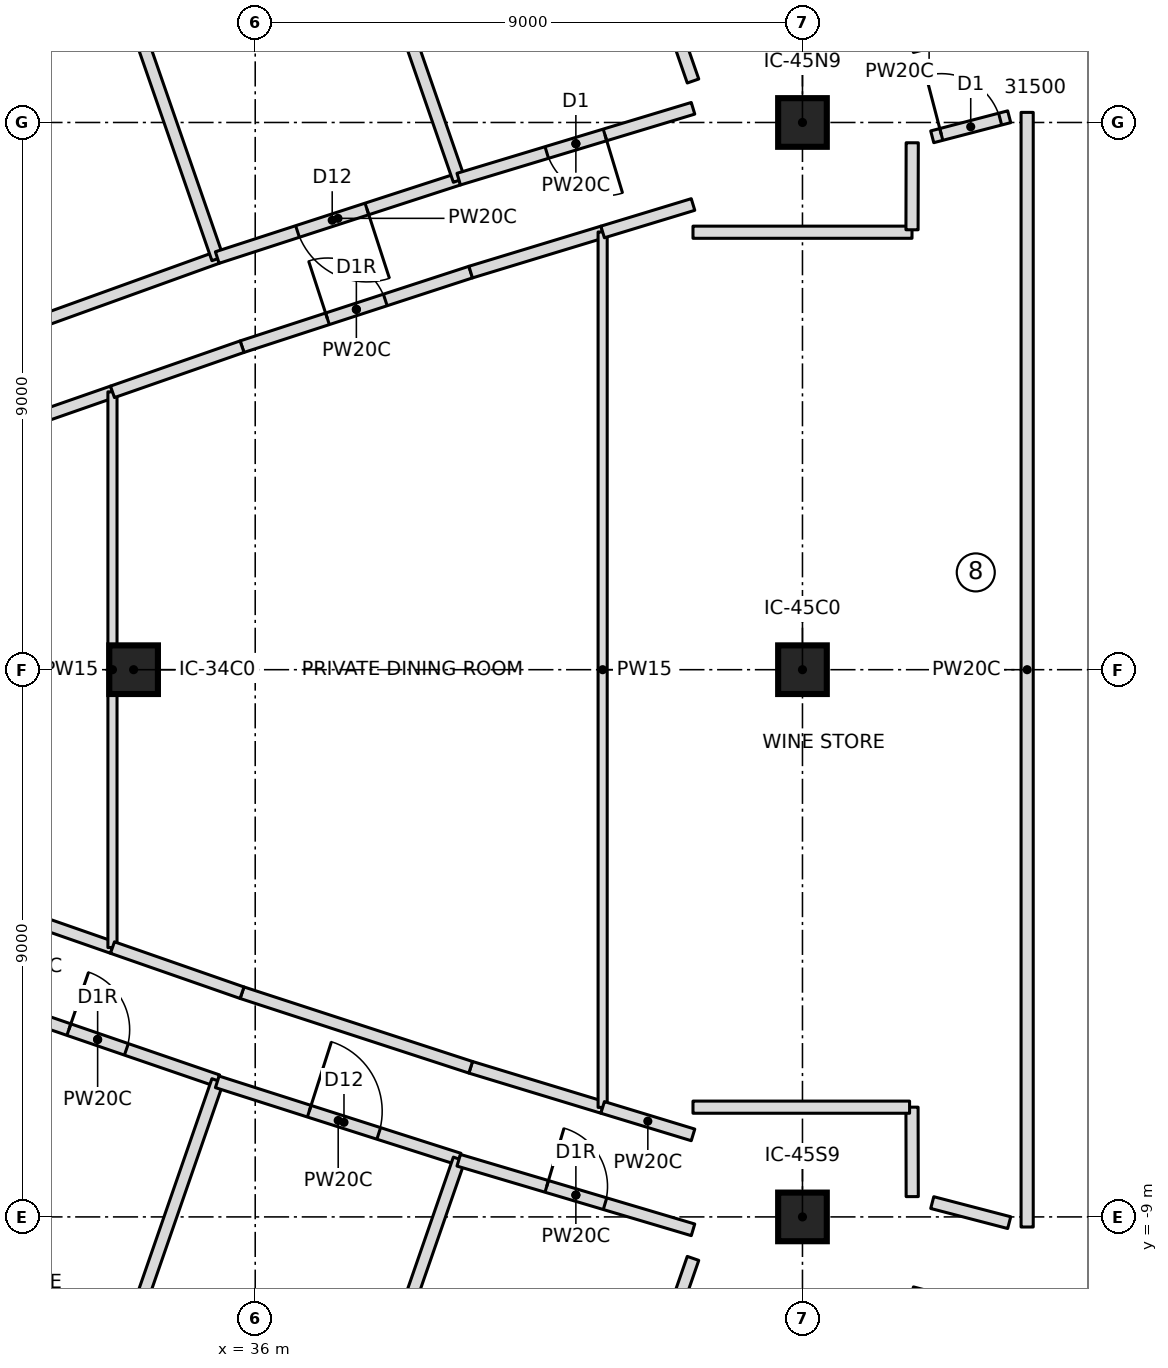
"""IFC4 building model, lengths in metres.
Left out: names, types, materials, properties, quantities, classifications, styles, units other than length and angle.
Written with IfcOpenShell. Run it as: python <this file> out.ifc"""

import sys

from ifc_helpers import new_model, si_unit, direction, frame, frame_2d, origin, origin_2d, place, context, subcontext, project, spatial, rectangle, extrude, element, fill, save


model = new_model("IFC4")
c1 = context("Model", 3, precision=1e-05, world=origin(), true_north=direction((0.0, 1.0)))
c2 = subcontext(c1, "Body", "Model", "MODEL_VIEW")
j1 = project(units=[si_unit("LENGTHUNIT", "METRE"), si_unit("PLANEANGLEUNIT", "RADIAN")], contexts=[c1])
p1 = place(None, origin())
s1 = spatial("IfcSite", under=j1, at=p1, CompositionType="ELEMENT")
p2 = place(p1, origin())
s2 = spatial("IfcBuilding", under=s1, at=p2, CompositionType="ELEMENT")
p3 = place(p2, frame((0.0, 0.0, 313.2)))
s3 = spatial("IfcBuildingStorey", under=s2, at=p3, CompositionType="ELEMENT", Elevation=313.2)
for number, where, z_axis, x_axis in (
    (1, (34.0, 0.0, 0.0), (0.0, 0.0, 1.0), (1.0, 0.0, 0.0)),
    (2, (45.0, -9.0, 0.0), (0.0, 0.0, 1.0), (1.0, 0.0, 0.0)),
    (3, (45.0, 0.0, 0.0), (0.0, 0.0, 1.0), (1.0, 0.0, 0.0)),
    (4, (45.0, 9.0, 0.0), (0.0, 0.0, 1.0), (1.0, 0.0, 0.0)),
):
    element("IfcColumn", number, at=place(p3, frame(where, z_axis=z_axis, x_axis=x_axis)), inside=s3, PredefinedType="COLUMN", context=c2, shape_type="SweptSolid", body=[
        extrude(rectangle(XDim=0.8, YDim=0.8, at=origin_2d()), origin(), (0.0, 0.0, 1.0), 5.4),
    ])
p4 = place(p3, frame((35.376, 6.779, 0.0), z_axis=(0.0, 0.0, 1.0), x_axis=(-0.940653782276, -0.339367738433, 0.0)))
e5 = element("IfcWall", 5, at=p4, inside=s3, PredefinedType="PARTITIONING", context=c2, shape_type="SweptSolid", body=[
    extrude(rectangle(XDim=8.347, YDim=0.2, at=frame_2d((4.174, 0.0))), origin(), (0.0, 0.0, 1.0), 5.1),
])
p5 = place(p4, frame((3.674, 0.0, 0.0)))
e6 = element("IfcOpeningElement", 6, at=p5, cuts=e5, PredefinedType="OPENING", context=c2, shape_type="SweptSolid", body=[
    extrude(rectangle(XDim=2.0, YDim=2.4, at=frame_2d((1.0, 1.2))), frame((0.0, 0.11, 0.0), z_axis=(0.0, -1.0, 0.0), x_axis=(1.0, 0.0, 0.0)), (0.0, 0.0, 1.0), 0.22),
])
p6 = place(p3, frame((35.382, 6.76, 0.0), z_axis=(0.0, 0.0, 1.0), x_axis=(-0.327699570064, 0.944781981083, 0.0)))
e7 = element("IfcWall", 7, at=p6, inside=s3, PredefinedType="PARTITIONING", context=c2, shape_type="SweptSolid", body=[
    extrude(rectangle(XDim=7.601, YDim=0.2, at=frame_2d((3.801, 0.0))), origin(), (0.0, 0.0, 1.0), 5.1),
])
p7 = place(p3, frame((39.347, 8.068, 0.0), z_axis=(0.0, 0.0, 1.0), x_axis=(-0.951104948213, -0.308867896493, 0.0)))
e8 = element("IfcWall", 8, at=p7, inside=s3, PredefinedType="PARTITIONING", context=c2, shape_type="SweptSolid", body=[
    extrude(rectangle(XDim=4.175, YDim=0.2, at=frame_2d((2.087, 0.0))), origin(), (0.0, 0.0, 1.0), 5.1),
])
p8 = place(p7, frame((1.588, 0.0, 0.0)))
e9 = element("IfcOpeningElement", 9, at=p8, cuts=e8, PredefinedType="OPENING", context=c2, shape_type="SweptSolid", body=[
    extrude(rectangle(XDim=1.2, YDim=2.1, at=frame_2d((0.6, 1.05))), frame((0.0, 0.11, 0.0), z_axis=(0.0, -1.0, 0.0), x_axis=(1.0, 0.0, 0.0)), (0.0, 0.0, 1.0), 0.22),
])
p9 = place(p3, frame((39.354, 8.049, 0.0), z_axis=(0.0, 0.0, 1.0), x_axis=(-0.327741126954, 0.944767565967, 0.0)))
e10 = element("IfcWall", 10, at=p9, inside=s3, PredefinedType="PARTITIONING", context=c2, shape_type="SweptSolid", body=[
    extrude(rectangle(XDim=7.606, YDim=0.2, at=frame_2d((3.803, 0.0))), origin(), (0.0, 0.0, 1.0), 5.1),
])
p10 = place(p3, frame((43.2, 9.233, 0.0), z_axis=(0.0, 0.0, 1.0), x_axis=(-0.957187982889, -0.289467036833, 0.0)))
e11 = element("IfcWall", 11, at=p10, inside=s3, PredefinedType="PARTITIONING", context=c2, shape_type="SweptSolid", body=[
    extrude(rectangle(XDim=4.026, YDim=0.2, at=frame_2d((2.013, 0.0))), origin(), (0.0, 0.0, 1.0), 5.1),
])
p11 = place(p10, frame((1.513, 0.0, 0.0)))
e12 = element("IfcOpeningElement", 12, at=p11, cuts=e11, PredefinedType="OPENING", context=c2, shape_type="SweptSolid", body=[
    extrude(rectangle(XDim=1.0, YDim=2.1, at=frame_2d((0.5, 1.05))), frame((0.0, 0.11, 0.0), z_axis=(0.0, -1.0, 0.0), x_axis=(1.0, 0.0, 0.0)), (0.0, 0.0, 1.0), 0.22),
])
p12 = place(p3, frame((43.2, 9.682, 0.0), z_axis=(0.0, 0.0, 1.0), x_axis=(-0.327701896972, 0.944781173987, 0.0)))
e13 = element("IfcWall", 13, at=p12, inside=s3, PredefinedType="PARTITIONING", context=c2, shape_type="SweptSolid", body=[
    extrude(rectangle(XDim=7.16, YDim=0.2, at=frame_2d((3.58, 0.0))), origin(), (0.0, 0.0, 1.0), 5.1),
])
p13 = place(p3, frame((47.365, 10.396, 0.0), z_axis=(0.0, 0.0, 1.0), x_axis=(-0.967635017449, -0.252353864654, 0.0)))
e14 = element("IfcWall", 14, at=p13, inside=s3, PredefinedType="PARTITIONING", context=c2, shape_type="SweptSolid", body=[
    extrude(rectangle(XDim=0.584, YDim=0.2, at=frame_2d((0.292, 0.0))), origin(), (0.0, 0.0, 1.0), 5.1),
])
p14 = place(p3, frame((31.434, -5.404, 0.0), z_axis=(0.0, 0.0, 1.0), x_axis=(0.945814630363, -0.324707075672, 0.0)))
e15 = element("IfcWall", 15, at=p14, inside=s3, PredefinedType="PARTITIONING", context=c2, shape_type="SweptSolid", body=[
    extrude(rectangle(XDim=4.174, YDim=0.2, at=frame_2d((2.087, 0.0))), origin(), (0.0, 0.0, 1.0), 5.1),
])
p15 = place(p14, frame((1.587, 0.0, 0.0)))
e16 = element("IfcOpeningElement", 16, at=p15, cuts=e15, PredefinedType="OPENING", context=c2, shape_type="SweptSolid", body=[
    extrude(rectangle(XDim=1.0, YDim=2.1, at=frame_2d((0.5, 1.05))), frame((0.0, 0.11, 0.0), z_axis=(0.0, -1.0, 0.0), x_axis=(1.0, 0.0, 0.0)), (0.0, 0.0, 1.0), 0.22),
])
p16 = place(p3, frame((32.891, -13.941, 0.0), z_axis=(0.0, 0.0, 1.0), x_axis=(0.327699570064, 0.944781981083, 0.0)))
e17 = element("IfcWall", 17, at=p16, inside=s3, PredefinedType="PARTITIONING", context=c2, shape_type="SweptSolid", body=[
    extrude(rectangle(XDim=7.601, YDim=0.2, at=frame_2d((3.801, 0.0))), origin(), (0.0, 0.0, 1.0), 5.1),
])
p17 = place(p3, frame((35.376, -6.779, 0.0), z_axis=(0.0, 0.0, 1.0), x_axis=(0.952572699992, -0.304311109278, 0.0)))
e18 = element("IfcWall", 18, at=p17, inside=s3, PredefinedType="PARTITIONING", context=c2, shape_type="SweptSolid", body=[
    extrude(rectangle(XDim=4.176, YDim=0.2, at=frame_2d((2.088, 0.0))), origin(), (0.0, 0.0, 1.0), 5.1),
])
p18 = place(p17, frame((1.588, 0.0, 0.0)))
e19 = element("IfcOpeningElement", 19, at=p18, cuts=e18, PredefinedType="OPENING", context=c2, shape_type="SweptSolid", body=[
    extrude(rectangle(XDim=1.2, YDim=2.1, at=frame_2d((0.6, 1.05))), frame((0.0, 0.11, 0.0), z_axis=(0.0, -1.0, 0.0), x_axis=(1.0, 0.0, 0.0)), (0.0, 0.0, 1.0), 0.22),
])
p19 = place(p3, frame((36.861, -15.235, 0.0), z_axis=(0.0, 0.0, 1.0), x_axis=(0.327741126954, 0.944767565967, 0.0)))
e20 = element("IfcWall", 20, at=p19, inside=s3, PredefinedType="PARTITIONING", context=c2, shape_type="SweptSolid", body=[
    extrude(rectangle(XDim=7.606, YDim=0.2, at=frame_2d((3.803, 0.0))), origin(), (0.0, 0.0, 1.0), 5.1),
])
p20 = place(p3, frame((39.347, -8.068, 0.0), z_axis=(0.0, 0.0, 1.0), x_axis=(0.958623301067, -0.284677653938, 0.0)))
e21 = element("IfcWall", 21, at=p20, inside=s3, PredefinedType="PARTITIONING", context=c2, shape_type="SweptSolid", body=[
    extrude(rectangle(XDim=4.02, YDim=0.2, at=frame_2d((2.01, 0.0))), origin(), (0.0, 0.0, 1.0), 5.1),
])
p21 = place(p20, frame((1.51, 0.0, 0.0)))
e22 = element("IfcOpeningElement", 22, at=p21, cuts=e21, PredefinedType="OPENING", context=c2, shape_type="SweptSolid", body=[
    extrude(rectangle(XDim=1.0, YDim=2.1, at=frame_2d((0.5, 1.05))), frame((0.0, 0.11, 0.0), z_axis=(0.0, -1.0, 0.0), x_axis=(1.0, 0.0, 0.0)), (0.0, 0.0, 1.0), 0.22),
])
p22 = place(p3, frame((40.854, -16.447, 0.0), z_axis=(0.0, 0.0, 1.0), x_axis=(0.327701896972, 0.944781173987, 0.0)))
e23 = element("IfcWall", 23, at=p22, inside=s3, PredefinedType="PARTITIONING", context=c2, shape_type="SweptSolid", body=[
    extrude(rectangle(XDim=7.16, YDim=0.2, at=frame_2d((3.58, 0.0))), origin(), (0.0, 0.0, 1.0), 5.1),
])
p23 = place(p3, frame((46.8, -10.248, 0.0), z_axis=(0.0, 0.0, 1.0), x_axis=(0.967635017449, -0.252353864654, 0.0)))
e24 = element("IfcWall", 24, at=p23, inside=s3, PredefinedType="PARTITIONING", context=c2, shape_type="SweptSolid", body=[
    extrude(rectangle(XDim=0.584, YDim=0.2, at=frame_2d((0.292, 0.0))), origin(), (0.0, 0.0, 1.0), 5.1),
])
for number, where, z_axis, x_axis in (
    (25, (33.652, -4.57, 0.0), (0.0, 0.0, 1.0), (-0.944, 0.329, 0.0)),
    (26, (32.049, 4.011, 0.0), (0.0, 0.0, 1.0), (0.944, 0.329, 0.0)),
):
    element("IfcWall", number, at=place(p3, frame(where, z_axis=z_axis, x_axis=x_axis)), inside=s3, PredefinedType="PARTITIONING", context=c2, shape_type="SweptSolid", body=[
        extrude(rectangle(XDim=1.698, YDim=0.2, at=frame_2d((0.849, 0.0))), origin(), (0.0, 0.0, 1.0), 5.1),
    ])
p24 = place(p3, frame((33.652, -4.57, 0.0), z_axis=(0.0, 0.0, 1.0), x_axis=(0.0, 1.0, 0.0)))
e27 = element("IfcWall", 27, at=p24, inside=s3, PredefinedType="PARTITIONING", context=c2, shape_type="SweptSolid", body=[
    extrude(rectangle(XDim=9.14, YDim=0.15, at=frame_2d((4.57, 0.0))), origin(), (0.0, 0.0, 1.0), 5.1),
])
p25 = place(p3, frame((35.783, 5.313, 0.0), z_axis=(0.0, 0.0, 1.0), x_axis=(0.950700567571, 0.310110352648, 0.0)))
e28 = element("IfcWall", 28, at=p25, inside=s3, PredefinedType="PARTITIONING", context=c2, shape_type="SweptSolid", body=[
    extrude(rectangle(XDim=3.955, YDim=0.2, at=frame_2d((1.978, 0.0))), origin(), (0.0, 0.0, 1.0), 5.1),
])
p26 = place(p25, frame((1.478, 0.0, 0.0)))
e29 = element("IfcOpeningElement", 29, at=p26, cuts=e28, PredefinedType="OPENING", context=c2, shape_type="SweptSolid", body=[
    extrude(rectangle(XDim=1.0, YDim=2.1, at=frame_2d((0.5, 1.05))), frame((0.0, 0.11, 0.0), z_axis=(0.0, -1.0, 0.0), x_axis=(1.0, 0.0, 0.0)), (0.0, 0.0, 1.0), 0.22),
])
for number, where, z_axis, x_axis in (
    (30, (39.544, 6.539, 0.0), (0.0, 0.0, 1.0), (0.957, 0.291, 0.0)),
    (31, (41.714, -7.199, 0.0), (0.0, 0.0, 1.0), (-0.957, 0.291, 0.0)),
):
    element("IfcWall", number, at=place(p3, frame(where, z_axis=z_axis, x_axis=x_axis)), inside=s3, PredefinedType="PARTITIONING", context=c2, shape_type="SweptSolid", body=[
        extrude(rectangle(XDim=2.268, YDim=0.2, at=frame_2d((1.134, 0.0))), origin(), (0.0, 0.0, 1.0), 5.1),
    ])
p27 = place(p3, frame((39.544, -6.539, 0.0), z_axis=(0.0, 0.0, 1.0), x_axis=(-0.950700567571, 0.310110352648, 0.0)))
e32 = element("IfcWall", 32, at=p27, inside=s3, PredefinedType="PARTITIONING", context=c2, shape_type="SweptSolid", body=[
    extrude(rectangle(XDim=3.955, YDim=0.2, at=frame_2d((1.978, 0.0))), origin(), (0.0, 0.0, 1.0), 5.1),
])
for number, where, z_axis, x_axis in (
    (33, (35.783, -5.313, 0.0), (0.0, 0.0, 1.0), (-0.944, 0.329, 0.0)),
    (34, (33.652, 4.57, 0.0), (0.0, 0.0, 1.0), (0.944, 0.329, 0.0)),
):
    element("IfcWall", number, at=place(p3, frame(where, z_axis=z_axis, x_axis=x_axis)), inside=s3, PredefinedType="PARTITIONING", context=c2, shape_type="SweptSolid", body=[
        extrude(rectangle(XDim=2.257, YDim=0.2, at=frame_2d((1.128, 0.0))), origin(), (0.0, 0.0, 1.0), 5.1),
    ])
p28 = place(p3, frame((41.714, -7.199, 0.0), z_axis=(0.0, 0.0, 1.0), x_axis=(0.0, 1.0, 0.0)))
e35 = element("IfcWall", 35, at=p28, inside=s3, PredefinedType="PARTITIONING", context=c2, shape_type="SweptSolid", body=[
    extrude(rectangle(XDim=14.398, YDim=0.15, at=frame_2d((7.199, 0.0))), origin(), (0.0, 0.0, 1.0), 5.1),
])
for number, where, z_axis, x_axis in (
    (36, (43.2, -7.651, 0.0), (0.0, 0.0, 1.0), (-0.957, 0.291, 0.0)),
    (37, (41.714, 7.199, 0.0), (0.0, 0.0, 1.0), (0.957, 0.291, 0.0)),
):
    element("IfcWall", number, at=place(p3, frame(where, z_axis=z_axis, x_axis=x_axis)), inside=s3, PredefinedType="PARTITIONING", context=c2, shape_type="SweptSolid", body=[
        extrude(rectangle(XDim=1.553, YDim=0.2, at=frame_2d((0.777, 0.0))), origin(), (0.0, 0.0, 1.0), 5.1),
    ])
p29 = place(p3, frame((47.134, 8.764, 0.0), z_axis=(0.0, 0.0, 1.0), x_axis=(0.967678694968, 0.252186326563, 0.0)))
e38 = element("IfcWall", 38, at=p29, inside=s3, PredefinedType="PARTITIONING", context=c2, shape_type="SweptSolid", body=[
    extrude(rectangle(XDim=1.308, YDim=0.2, at=frame_2d((0.654, 0.0))), origin(), (0.0, 0.0, 1.0), 5.1),
])
p30 = place(p29, frame((0.154, 0.0, 0.0)))
e39 = element("IfcOpeningElement", 39, at=p30, cuts=e38, PredefinedType="OPENING", context=c2, shape_type="SweptSolid", body=[
    extrude(rectangle(XDim=1.0, YDim=2.1, at=frame_2d((0.5, 1.05))), frame((0.0, 0.11, 0.0), z_axis=(0.0, -1.0, 0.0), x_axis=(1.0, 0.0, 0.0)), (0.0, 0.0, 1.0), 0.22),
])
p31 = place(p3, frame((48.4, -9.094, 0.0), z_axis=(0.0, 0.0, 1.0), x_axis=(-0.967678694968, 0.252186326563, 0.0)))
e40 = element("IfcWall", 40, at=p31, inside=s3, PredefinedType="PARTITIONING", context=c2, shape_type="SweptSolid", body=[
    extrude(rectangle(XDim=1.308, YDim=0.2, at=frame_2d((0.654, 0.0))), origin(), (0.0, 0.0, 1.0), 5.1),
])
p32 = place(p3, frame((43.199, 7.195, 0.0), z_axis=(0.0, 0.0, 1.0), x_axis=(0.999999997703, 6.7778229e-05, 0.0)))
e41 = element("IfcWall", 41, at=p32, inside=s3, PredefinedType="PARTITIONING", context=c2, shape_type="SweptSolid", body=[
    extrude(rectangle(XDim=3.602, YDim=0.2, at=frame_2d((1.801, 0.0))), origin(), (0.0, 0.0, 1.0), 5.1),
])
p33 = place(p3, frame((46.802, 7.235, 0.0), z_axis=(0.0, 0.0, 1.0), x_axis=(0.00238825658, 0.999997148111, 0.0)))
e42 = element("IfcWall", 42, at=p33, inside=s3, PredefinedType="PARTITIONING", context=c2, shape_type="SweptSolid", body=[
    extrude(rectangle(XDim=1.431, YDim=0.2, at=frame_2d((0.716, 0.0))), origin(), (0.0, 0.0, 1.0), 5.1),
])
p34 = place(p3, frame((48.695, 9.166, 0.0), z_axis=(0.0, 0.0, 1.0), x_axis=(0.0, -1.0, 0.0)))
e43 = element("IfcWall", 43, at=p34, inside=s3, PredefinedType="PARTITIONING", context=c2, shape_type="SweptSolid", body=[
    extrude(rectangle(XDim=18.332, YDim=0.2, at=frame_2d((9.166, 0.0))), origin(), (0.0, 0.0, 1.0), 5.1),
])
p35 = place(p3, frame((46.805, -8.666, 0.0), z_axis=(0.0, 0.0, 1.0), x_axis=(-0.002323645179, 0.999997300333, 0.0)))
e44 = element("IfcWall", 44, at=p35, inside=s3, PredefinedType="PARTITIONING", context=c2, shape_type="SweptSolid", body=[
    extrude(rectangle(XDim=1.471, YDim=0.2, at=frame_2d((0.735, 0.0))), origin(), (0.0, 0.0, 1.0), 5.1),
])
p36 = place(p3, frame((46.761, -7.195, 0.0), z_axis=(0.0, 0.0, 1.0), x_axis=(-0.999999997651, 6.8540096e-05, 0.0)))
e45 = element("IfcWall", 45, at=p36, inside=s3, PredefinedType="PARTITIONING", context=c2, shape_type="SweptSolid", body=[
    extrude(rectangle(XDim=3.562, YDim=0.2, at=frame_2d((1.781, 0.0))), origin(), (0.0, 0.0, 1.0), 5.1),
])
p37 = place(p8, origin())
e46 = element("IfcDoor", 46, at=p37, inside=s3, OperationType="SINGLE_SWING_RIGHT", PredefinedType="DOOR", context=c2, shape_type="SweptSolid", body=[
    extrude(rectangle(XDim=1.2, YDim=2.1, at=frame_2d((0.6, 1.05))), frame((0.0, 0.025, 0.0), z_axis=(0.0, -1.0, 0.0), x_axis=(1.0, 0.0, 0.0)), (0.0, 0.0, 1.0), 0.05),
])
fill(e9, e46)
p38 = place(p11, origin())
e47 = element("IfcDoor", 47, at=p38, inside=s3, OperationType="SINGLE_SWING_LEFT", PredefinedType="DOOR", context=c2, shape_type="SweptSolid", body=[
    extrude(rectangle(XDim=1.0, YDim=2.1, at=frame_2d((0.5, 1.05))), frame((0.0, 0.025, 0.0), z_axis=(0.0, -1.0, 0.0), x_axis=(1.0, 0.0, 0.0)), (0.0, 0.0, 1.0), 0.05),
])
fill(e12, e47)
p39 = place(p15, origin())
e48 = element("IfcDoor", 48, at=p39, inside=s3, OperationType="SINGLE_SWING_RIGHT", PredefinedType="DOOR", context=c2, shape_type="SweptSolid", body=[
    extrude(rectangle(XDim=1.0, YDim=2.1, at=frame_2d((0.5, 1.05))), frame((0.0, 0.025, 0.0), z_axis=(0.0, -1.0, 0.0), x_axis=(1.0, 0.0, 0.0)), (0.0, 0.0, 1.0), 0.05),
])
fill(e16, e48)
p40 = place(p18, origin())
e49 = element("IfcDoor", 49, at=p40, inside=s3, OperationType="SINGLE_SWING_RIGHT", PredefinedType="DOOR", context=c2, shape_type="SweptSolid", body=[
    extrude(rectangle(XDim=1.2, YDim=2.1, at=frame_2d((0.6, 1.05))), frame((0.0, 0.025, 0.0), z_axis=(0.0, -1.0, 0.0), x_axis=(1.0, 0.0, 0.0)), (0.0, 0.0, 1.0), 0.05),
])
fill(e19, e49)
p41 = place(p21, origin())
e50 = element("IfcDoor", 50, at=p41, inside=s3, OperationType="SINGLE_SWING_RIGHT", PredefinedType="DOOR", context=c2, shape_type="SweptSolid", body=[
    extrude(rectangle(XDim=1.0, YDim=2.1, at=frame_2d((0.5, 1.05))), frame((0.0, 0.025, 0.0), z_axis=(0.0, -1.0, 0.0), x_axis=(1.0, 0.0, 0.0)), (0.0, 0.0, 1.0), 0.05),
])
fill(e22, e50)
p42 = place(p26, origin())
e51 = element("IfcDoor", 51, at=p42, inside=s3, OperationType="SINGLE_SWING_RIGHT", PredefinedType="DOOR", context=c2, shape_type="SweptSolid", body=[
    extrude(rectangle(XDim=1.0, YDim=2.1, at=frame_2d((0.5, 1.05))), frame((0.0, 0.025, 0.0), z_axis=(0.0, -1.0, 0.0), x_axis=(1.0, 0.0, 0.0)), (0.0, 0.0, 1.0), 0.05),
])
fill(e29, e51)
p43 = place(p30, origin())
e52 = element("IfcDoor", 52, at=p43, inside=s3, OperationType="SINGLE_SWING_LEFT", PredefinedType="DOOR", context=c2, shape_type="SweptSolid", body=[
    extrude(rectangle(XDim=1.0, YDim=2.1, at=frame_2d((0.5, 1.05))), frame((0.0, 0.025, 0.0), z_axis=(0.0, -1.0, 0.0), x_axis=(1.0, 0.0, 0.0)), (0.0, 0.0, 1.0), 0.05),
])
fill(e39, e52)
save(model, sys.argv[1])
